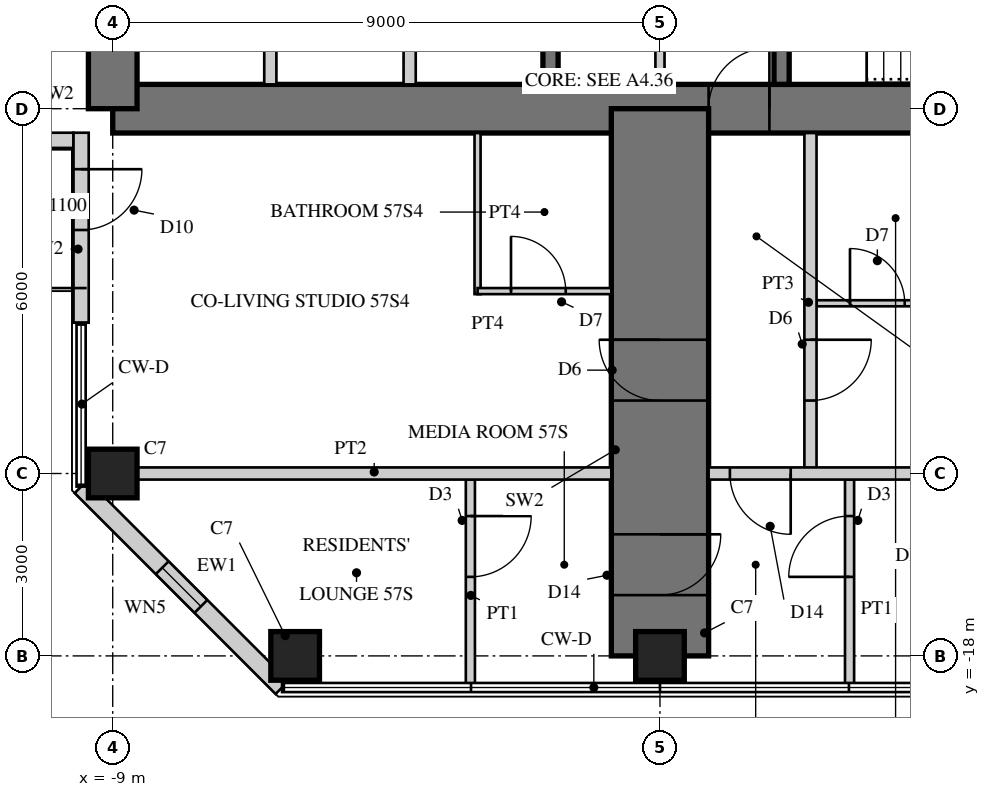
"""IFC4 building model, lengths in metres.
Left out: names, types, materials, properties, quantities, classifications, styles, units other than length and angle.
Written with IfcOpenShell. Run it as: python <this file> out.ifc"""

import sys

from ifc_helpers import new_model, si_unit, direction, frame, frame_2d, origin, origin_2d, place, context, subcontext, project, spatial, rectangle, hollow_rectangle, extrude, element, fill, save


model = new_model("IFC4")
c1 = context("Model", 3, precision=1e-05, world=origin(), true_north=direction((0.0, 1.0)))
c2 = subcontext(c1, "Body", "Model", "MODEL_VIEW")
j1 = project(units=[si_unit("LENGTHUNIT", "METRE"), si_unit("PLANEANGLEUNIT", "RADIAN")], contexts=[c1])
p1 = place(None, origin())
s1 = spatial("IfcSite", under=j1, at=p1, CompositionType="ELEMENT")
p2 = place(p1, origin())
s2 = spatial("IfcBuilding", under=s1, at=p2, CompositionType="ELEMENT")
p3 = place(p2, frame((0.0, 0.0, 225.5)))
s3 = spatial("IfcBuildingStorey", under=s2, at=p3, CompositionType="ELEMENT", Elevation=225.5)
p4 = place(p3, frame((-9.0, -9.0, 0.0), z_axis=(0.0, 0.0, 1.0), x_axis=(1.0, 0.0, 0.0)))
e1 = element("IfcWall", 1, at=p4, inside=s3, PredefinedType="SHEAR", context=c2, shape_type="SweptSolid", body=[
    extrude(rectangle(XDim=18.0, YDim=0.8, at=frame_2d((9.0, 0.0))), origin(), (0.0, 0.0, 1.0), 3.4),
])
p5 = place(p4, frame((9.8, 0.0, 0.0)))
e2 = element("IfcOpeningElement", 2, at=p5, cuts=e1, PredefinedType="OPENING", context=c2, shape_type="SweptSolid", body=[
    extrude(rectangle(XDim=1.0, YDim=2.4, at=frame_2d((0.5, 1.2))), frame((0.0, 0.41, 0.0), z_axis=(0.0, -1.0, 0.0), x_axis=(1.0, 0.0, 0.0)), (0.0, 0.0, 1.0), 0.82),
])
p6 = place(p3, frame((-9.0, 9.0, 0.0), z_axis=(0.0, 0.0, 1.0), x_axis=(0.0, -1.0, 0.0)))
e3 = element("IfcWall", 3, at=p6, inside=s3, PredefinedType="SHEAR", context=c2, shape_type="SweptSolid", body=[
    extrude(rectangle(XDim=18.0, YDim=0.8, at=frame_2d((9.0, 0.0))), origin(), (0.0, 0.0, 1.0), 3.4),
])
p7 = place(p6, frame((9.8, 0.0, 0.0)))
e4 = element("IfcOpeningElement", 4, at=p7, cuts=e3, PredefinedType="OPENING", context=c2, shape_type="SweptSolid", body=[
    extrude(rectangle(XDim=1.0, YDim=2.4, at=frame_2d((0.5, 1.2))), frame((0.0, 0.41, 0.0), z_axis=(0.0, -1.0, 0.0), x_axis=(1.0, 0.0, 0.0)), (0.0, 0.0, 1.0), 0.82),
])
p8 = place(p3, frame((-1.8, -1.875, 0.0), z_axis=(0.0, 0.0, 1.0), x_axis=(0.0, -1.0, 0.0)))
e5 = element("IfcWall", 5, at=p8, inside=s3, PredefinedType="SHEAR", context=c2, shape_type="SweptSolid", body=[
    extrude(rectangle(XDim=6.725, YDim=0.25, at=frame_2d((3.363, 0.0))), origin(), (0.0, 0.0, 1.0), 3.4),
])
p9 = place(p8, frame((1.875, 0.0, 0.0)))
e6 = element("IfcOpeningElement", 6, at=p9, cuts=e5, PredefinedType="OPENING", context=c2, shape_type="SweptSolid", body=[
    extrude(rectangle(XDim=1.6, YDim=2.4, at=frame_2d((0.8, 1.2))), frame((0.0, 0.135, 0.0), z_axis=(0.0, -1.0, 0.0), x_axis=(1.0, 0.0, 0.0)), (0.0, 0.0, 1.0), 0.27),
])
for number, where, z_axis, x_axis in (
    (7, (-4.117, -5.975, 0.0), (0.0, 0.0, 1.0), (0.0, -1.0, 0.0)),
    (8, (-6.408, -5.975, 0.0), (0.0, 0.0, 1.0), (0.0, -1.0, 0.0)),
):
    element("IfcWall", number, at=place(p3, frame(where, z_axis=z_axis, x_axis=x_axis)), inside=s3, PredefinedType="PARTITIONING", context=c2, shape_type="SweptSolid", body=[
        extrude(rectangle(XDim=2.625, YDim=0.2, at=frame_2d((1.312, 0.0))), origin(), (0.0, 0.0, 1.0), 3.4),
    ])
p10 = place(p3, frame((2.0, -1.675, 0.0), z_axis=(0.0, 0.0, 1.0), x_axis=(0.0, -1.0, 0.0)))
e9 = element("IfcWall", 9, at=p10, inside=s3, PredefinedType="SHEAR", context=c2, shape_type="SweptSolid", body=[
    extrude(rectangle(XDim=6.925, YDim=0.25, at=frame_2d((3.462, 0.0))), origin(), (0.0, 0.0, 1.0), 3.4),
])
p11 = place(p10, frame((0.725, 0.0, 0.0)))
e10 = element("IfcOpeningElement", 10, at=p11, cuts=e9, PredefinedType="OPENING", context=c2, shape_type="SweptSolid", body=[
    extrude(rectangle(XDim=1.0, YDim=2.1, at=frame_2d((0.5, 1.05))), frame((0.0, 0.135, 0.0), z_axis=(0.0, -1.0, 0.0), x_axis=(1.0, 0.0, 0.0)), (0.0, 0.0, 1.0), 0.27),
])
p12 = place(p3, frame((0.0, -9.0, 0.0), z_axis=(0.0, 0.0, 1.0), x_axis=(0.0, -1.0, 0.0)))
e11 = element("IfcWall", 11, at=p12, inside=s3, PredefinedType="SHEAR", context=c2, shape_type="SweptSolid", body=[
    extrude(rectangle(XDim=9.0, YDim=1.6, at=frame_2d((4.5, 0.0))), origin(), (0.0, 0.0, 1.0), 3.4),
])
p13 = place(p12, frame((3.8, 0.0, 0.0)))
e12 = element("IfcOpeningElement", 12, at=p13, cuts=e11, PredefinedType="OPENING", context=c2, shape_type="SweptSolid", body=[
    extrude(rectangle(XDim=1.0, YDim=2.15, at=frame_2d((0.5, 1.075))), frame((0.0, 0.81, 0.0), z_axis=(0.0, -1.0, 0.0), x_axis=(1.0, 0.0, 0.0)), (0.0, 0.0, 1.0), 1.62),
])
p14 = place(p12, frame((7.0, 0.0, 0.0)))
e13 = element("IfcOpeningElement", 13, at=p14, cuts=e11, PredefinedType="OPENING", context=c2, shape_type="SweptSolid", body=[
    extrude(rectangle(XDim=1.0, YDim=2.2, at=frame_2d((0.5, 1.1))), frame((0.0, 0.81, 0.0), z_axis=(0.0, -1.0, 0.0), x_axis=(1.0, 0.0, 0.0)), (0.0, 0.0, 1.0), 1.62),
])
for number, where, z_axis, x_axis in (
    (14, (-9.0, -15.0, 0.0), (0.0, 0.0, 1.0), (1.0, 0.0, 0.0)),
    (15, (-6.0, -18.0, 0.0), (0.0, 0.0, 1.0), (1.0, 0.0, 0.0)),
    (16, (0.0, -18.0, 0.0), (0.0, 0.0, 1.0), (1.0, 0.0, 0.0)),
):
    element("IfcColumn", number, at=place(p3, frame(where, z_axis=z_axis, x_axis=x_axis)), inside=s3, PredefinedType="COLUMN", context=c2, shape_type="SweptSolid", body=[
        extrude(rectangle(XDim=0.8, YDim=0.8, at=origin_2d()), origin(), (0.0, 0.0, 1.0), 3.4),
    ])
p15 = place(p3, frame((-12.52, -9.52, 0.0), z_axis=(0.0, 0.0, 1.0), x_axis=(1.0, 0.0, 0.0)))
e17 = element("IfcWall", 17, at=p15, inside=s3, PredefinedType="SOLIDWALL", context=c2, shape_type="SweptSolid", body=[
    extrude(rectangle(XDim=2.875, YDim=0.25, at=frame_2d((1.438, 0.0))), origin(), (0.0, 0.0, 1.0), 3.22),
])
p16 = place(p15, frame((0.6, 0.0, 0.0)))
e18 = element("IfcOpeningElement", 18, at=p16, cuts=e17, PredefinedType="OPENING", context=c2, shape_type="SweptSolid", body=[
    extrude(rectangle(XDim=1.0, YDim=2.2, at=frame_2d((0.5, 1.1))), frame((0.0, 0.135, 0.0), z_axis=(0.0, -1.0, 0.0), x_axis=(1.0, 0.0, 0.0)), (0.0, 0.0, 1.0), 0.27),
])
p17 = place(p3, frame((-9.52, -9.395, 0.0), z_axis=(0.0, 0.0, 1.0), x_axis=(0.0, -1.0, 0.0)))
e19 = element("IfcWall", 19, at=p17, inside=s3, PredefinedType="SOLIDWALL", context=c2, shape_type="SweptSolid", body=[
    extrude(rectangle(XDim=3.125, YDim=0.25, at=frame_2d((1.562, 0.0))), origin(), (0.0, 0.0, 1.0), 3.22),
])
p18 = place(p17, frame((0.6, 0.0, 0.0)))
e20 = element("IfcOpeningElement", 20, at=p18, cuts=e19, PredefinedType="OPENING", context=c2, shape_type="SweptSolid", body=[
    extrude(rectangle(XDim=1.0, YDim=2.2, at=frame_2d((0.5, 1.1))), frame((0.0, 0.135, 0.0), z_axis=(0.0, -1.0, 0.0), x_axis=(1.0, 0.0, 0.0)), (0.0, 0.0, 1.0), 0.27),
])
p19 = place(p3, frame((-9.52, -15.215, 0.0), z_axis=(0.0, 0.0, 1.0), x_axis=(0.707106781187, -0.707106781187, 0.0)))
e21 = element("IfcWall", 21, at=p19, inside=s3, PredefinedType="SOLIDWALL", context=c2, shape_type="SweptSolid", body=[
    extrude(rectangle(XDim=4.674, YDim=0.3, at=frame_2d((2.337, 0.0))), origin(), (0.0, 0.0, 1.0), 3.22),
])
p20 = place(p19, frame((1.887, 0.0, 0.3)))
e22 = element("IfcOpeningElement", 22, at=p20, cuts=e21, PredefinedType="OPENING", context=c2, shape_type="SweptSolid", body=[
    extrude(rectangle(XDim=0.9, YDim=2.4, at=frame_2d((0.45, 1.2))), frame((0.0, 0.16, 0.0), z_axis=(0.0, -1.0, 0.0), x_axis=(1.0, 0.0, 0.0)), (0.0, 0.0, 1.0), 0.32),
])
p21 = place(p3, frame((0.0, -5.675, 0.0), z_axis=(0.0, 0.0, 1.0), x_axis=(0.0, -1.0, 0.0)))
e23 = element("IfcWall", 23, at=p21, inside=s3, PredefinedType="PARTITIONING", context=c2, shape_type="SweptSolid", body=[
    extrude(rectangle(XDim=2.925, YDim=0.15, at=frame_2d((1.462, 0.0))), origin(), (0.0, 0.0, 1.0), 3.22),
])
p22 = place(p21, frame((0.4, 0.0, 0.0)))
e24 = element("IfcOpeningElement", 24, at=p22, cuts=e23, PredefinedType="OPENING", context=c2, shape_type="SweptSolid", body=[
    extrude(rectangle(XDim=1.0, YDim=2.1, at=frame_2d((0.5, 1.05))), frame((0.0, 0.085, 0.0), z_axis=(0.0, -1.0, 0.0), x_axis=(1.0, 0.0, 0.0)), (0.0, 0.0, 1.0), 0.17),
])
p23 = place(p3, frame((2.575, -12.2, 0.0), z_axis=(0.0, 0.0, 1.0), x_axis=(1.0, 0.0, 0.0)))
e25 = element("IfcWall", 25, at=p23, inside=s3, PredefinedType="PARTITIONING", context=c2, shape_type="SweptSolid", body=[
    extrude(rectangle(XDim=2.6, YDim=0.1, at=frame_2d((1.3, 0.0))), origin(), (0.0, 0.0, 1.0), 3.22),
])
p24 = place(p23, frame((0.55, 0.0, 0.0)))
e26 = element("IfcOpeningElement", 26, at=p24, cuts=e25, PredefinedType="OPENING", context=c2, shape_type="SweptSolid", body=[
    extrude(rectangle(XDim=0.9, YDim=2.1, at=frame_2d((0.45, 1.05))), frame((0.0, 0.06, 0.0), z_axis=(0.0, -1.0, 0.0), x_axis=(1.0, 0.0, 0.0)), (0.0, 0.0, 1.0), 0.12),
])
p25 = place(p3, frame((-3.0, -9.4, 0.0), z_axis=(0.0, 0.0, 1.0), x_axis=(0.0, -1.0, 0.0)))
e27 = element("IfcWall", 27, at=p25, inside=s3, PredefinedType="PARTITIONING", context=c2, shape_type="SweptSolid", body=[
    extrude(rectangle(XDim=2.65, YDim=0.1, at=frame_2d((1.325, 0.0))), origin(), (0.0, 0.0, 1.0), 3.22),
])
p26 = place(p3, frame((-3.0, -12.0, 0.0), z_axis=(0.0, 0.0, 1.0), x_axis=(1.0, 0.0, 0.0)))
e28 = element("IfcWall", 28, at=p26, inside=s3, PredefinedType="PARTITIONING", context=c2, shape_type="SweptSolid", body=[
    extrude(rectangle(XDim=2.2, YDim=0.1, at=frame_2d((1.1, 0.0))), origin(), (0.0, 0.0, 1.0), 3.22),
])
p27 = place(p26, frame((0.55, 0.0, 0.0)))
e29 = element("IfcOpeningElement", 29, at=p27, cuts=e28, PredefinedType="OPENING", context=c2, shape_type="SweptSolid", body=[
    extrude(rectangle(XDim=0.9, YDim=2.1, at=frame_2d((0.45, 1.05))), frame((0.0, 0.06, 0.0), z_axis=(0.0, -1.0, 0.0), x_axis=(1.0, 0.0, 0.0)), (0.0, 0.0, 1.0), 0.12),
])
p28 = place(p3, frame((2.475, -9.4, 0.0), z_axis=(0.0, 0.0, 1.0), x_axis=(0.0, -1.0, 0.0)))
e30 = element("IfcWall", 30, at=p28, inside=s3, PredefinedType="SOLIDWALL", context=c2, shape_type="SweptSolid", body=[
    extrude(rectangle(XDim=5.6, YDim=0.2, at=frame_2d((2.8, 0.0))), origin(), (0.0, 0.0, 1.0), 3.22),
])
p29 = place(p28, frame((3.4, 0.0, 0.0)))
e31 = element("IfcOpeningElement", 31, at=p29, cuts=e30, PredefinedType="OPENING", context=c2, shape_type="SweptSolid", body=[
    extrude(rectangle(XDim=1.0, YDim=2.15, at=frame_2d((0.5, 1.075))), frame((0.0, 0.11, 0.0), z_axis=(0.0, -1.0, 0.0), x_axis=(1.0, 0.0, 0.0)), (0.0, 0.0, 1.0), 0.22),
])
p30 = place(p3, frame((3.118, -15.1, 0.0), z_axis=(0.0, 0.0, 1.0), x_axis=(0.0, -1.0, 0.0)))
e32 = element("IfcWall", 32, at=p30, inside=s3, PredefinedType="PARTITIONING", context=c2, shape_type="SweptSolid", body=[
    extrude(rectangle(XDim=3.38, YDim=0.15, at=frame_2d((1.69, 0.0))), origin(), (0.0, 0.0, 1.0), 3.22),
])
p31 = place(p30, frame((0.6, 0.0, 0.0)))
e33 = element("IfcOpeningElement", 33, at=p31, cuts=e32, PredefinedType="OPENING", context=c2, shape_type="SweptSolid", body=[
    extrude(rectangle(XDim=1.0, YDim=2.1, at=frame_2d((0.5, 1.05))), frame((0.0, 0.085, 0.0), z_axis=(0.0, -1.0, 0.0), x_axis=(1.0, 0.0, 0.0)), (0.0, 0.0, 1.0), 0.17),
])
p32 = place(p3, frame((-3.118, -15.1, 0.0), z_axis=(0.0, 0.0, 1.0), x_axis=(0.0, -1.0, 0.0)))
e34 = element("IfcWall", 34, at=p32, inside=s3, PredefinedType="PARTITIONING", context=c2, shape_type="SweptSolid", body=[
    extrude(rectangle(XDim=3.38, YDim=0.15, at=frame_2d((1.69, 0.0))), origin(), (0.0, 0.0, 1.0), 3.22),
])
p33 = place(p32, frame((0.6, 0.0, 0.0)))
e35 = element("IfcOpeningElement", 35, at=p33, cuts=e34, PredefinedType="OPENING", context=c2, shape_type="SweptSolid", body=[
    extrude(rectangle(XDim=1.0, YDim=2.1, at=frame_2d((0.5, 1.05))), frame((0.0, 0.085, 0.0), z_axis=(0.0, -1.0, 0.0), x_axis=(1.0, 0.0, 0.0)), (0.0, 0.0, 1.0), 0.17),
])
p34 = place(p3, frame((-8.6, -15.0, 0.0), z_axis=(0.0, 0.0, 1.0), x_axis=(1.0, 0.0, 0.0)))
e36 = element("IfcWall", 36, at=p34, inside=s3, PredefinedType="SOLIDWALL", context=c2, shape_type="SweptSolid", body=[
    extrude(rectangle(XDim=7.8, YDim=0.2, at=frame_2d((3.9, 0.0))), origin(), (0.0, 0.0, 1.0), 2.52),
])
p35 = place(p3, frame((0.8, -15.0, 0.0), z_axis=(0.0, 0.0, 1.0), x_axis=(1.0, 0.0, 0.0)))
e37 = element("IfcWall", 37, at=p35, inside=s3, PredefinedType="SOLIDWALL", context=c2, shape_type="SweptSolid", body=[
    extrude(rectangle(XDim=7.8, YDim=0.2, at=frame_2d((3.9, 0.0))), origin(), (0.0, 0.0, 1.0), 2.52),
])
p36 = place(p35, frame((0.35, 0.0, 0.0)))
e38 = element("IfcOpeningElement", 38, at=p36, cuts=e37, PredefinedType="OPENING", context=c2, shape_type="SweptSolid", body=[
    extrude(rectangle(XDim=1.0, YDim=2.2, at=frame_2d((0.5, 1.1))), frame((0.0, 0.11, 0.0), z_axis=(0.0, -1.0, 0.0), x_axis=(1.0, 0.0, 0.0)), (0.0, 0.0, 1.0), 0.22),
])
p37 = place(p18, origin())
e39 = element("IfcDoor", 39, at=p37, inside=s3, OperationType="SINGLE_SWING_LEFT", PredefinedType="DOOR", context=c2, shape_type="SweptSolid", body=[
    extrude(hollow_rectangle(XDim=1.0, YDim=2.2, WallThickness=0.06, at=frame_2d((0.5, 1.1))), frame((0.0, 0.025, 0.0), z_axis=(0.0, -1.0, 0.0), x_axis=(1.0, 0.0, 0.0)), (0.0, 0.0, 1.0), 0.05),
    extrude(rectangle(XDim=0.879, YDim=2.079, at=frame_2d((0.5, 1.1))), frame((0.0, 0.025, 0.0), z_axis=(0.0, -1.0, 0.0), x_axis=(1.0, 0.0, 0.0)), (0.0, 0.0, 1.0), 0.05),
])
fill(e20, e39)
p38 = place(p20, origin())
e40 = element("IfcWindow", 40, at=p38, inside=s3, PartitioningType="SINGLE_PANEL", PredefinedType="WINDOW", context=c2, shape_type="SweptSolid", body=[
    extrude(hollow_rectangle(XDim=0.9, YDim=2.4, WallThickness=0.06, at=frame_2d((0.45, 1.2))), frame((0.0, 0.03, 0.0), z_axis=(0.0, -1.0, 0.0), x_axis=(1.0, 0.0, 0.0)), (0.0, 0.0, 1.0), 0.06),
    extrude(rectangle(XDim=0.779, YDim=2.279, at=frame_2d((0.45, 1.2))), frame((0.0, 0.03, 0.0), z_axis=(0.0, -1.0, 0.0), x_axis=(1.0, 0.0, 0.0)), (0.0, 0.0, 1.0), 0.06),
])
fill(e22, e40)
p39 = place(p24, origin())
e41 = element("IfcDoor", 41, at=p39, inside=s3, OperationType="SINGLE_SWING_LEFT", PredefinedType="DOOR", context=c2, shape_type="SweptSolid", body=[
    extrude(rectangle(XDim=0.9, YDim=2.1, at=frame_2d((0.45, 1.05))), frame((0.0, 0.025, 0.0), z_axis=(0.0, -1.0, 0.0), x_axis=(1.0, 0.0, 0.0)), (0.0, 0.0, 1.0), 0.05),
])
fill(e26, e41)
p40 = place(p27, origin())
e42 = element("IfcDoor", 42, at=p40, inside=s3, OperationType="SINGLE_SWING_LEFT", PredefinedType="DOOR", context=c2, shape_type="SweptSolid", body=[
    extrude(rectangle(XDim=0.9, YDim=2.1, at=frame_2d((0.45, 1.05))), frame((0.0, 0.025, 0.0), z_axis=(0.0, -1.0, 0.0), x_axis=(1.0, 0.0, 0.0)), (0.0, 0.0, 1.0), 0.05),
])
fill(e29, e42)
p41 = place(p29, origin())
e43 = element("IfcDoor", 43, at=p41, inside=s3, OperationType="SINGLE_SWING_LEFT", PredefinedType="DOOR", context=c2, shape_type="SweptSolid", body=[
    extrude(rectangle(XDim=1.0, YDim=2.15, at=frame_2d((0.5, 1.075))), frame((0.0, 0.025, 0.0), z_axis=(0.0, -1.0, 0.0), x_axis=(1.0, 0.0, 0.0)), (0.0, 0.0, 1.0), 0.05),
])
fill(e31, e43)
p42 = place(p31, frame((1.0, 0.0, 0.0), z_axis=(0.0, 0.0, 1.0), x_axis=(-1.0, 0.0, 0.0)))
e44 = element("IfcDoor", 44, at=p42, inside=s3, OperationType="SINGLE_SWING_LEFT", PredefinedType="DOOR", context=c2, shape_type="SweptSolid", body=[
    extrude(rectangle(XDim=1.0, YDim=2.1, at=frame_2d((0.5, 1.05))), frame((0.0, 0.025, 0.0), z_axis=(0.0, -1.0, 0.0), x_axis=(1.0, 0.0, 0.0)), (0.0, 0.0, 1.0), 0.05),
])
fill(e33, e44)
p43 = place(p33, origin())
e45 = element("IfcDoor", 45, at=p43, inside=s3, OperationType="SINGLE_SWING_LEFT", PredefinedType="DOOR", context=c2, shape_type="SweptSolid", body=[
    extrude(rectangle(XDim=1.0, YDim=2.1, at=frame_2d((0.5, 1.05))), frame((0.0, 0.025, 0.0), z_axis=(0.0, -1.0, 0.0), x_axis=(1.0, 0.0, 0.0)), (0.0, 0.0, 1.0), 0.05),
])
fill(e35, e45)
p44 = place(p36, frame((1.0, 0.0, 0.0), z_axis=(0.0, 0.0, 1.0), x_axis=(-1.0, 0.0, 0.0)))
e46 = element("IfcDoor", 46, at=p44, inside=s3, OperationType="SINGLE_SWING_LEFT", PredefinedType="DOOR", context=c2, shape_type="SweptSolid", body=[
    extrude(rectangle(XDim=1.0, YDim=2.2, at=frame_2d((0.5, 1.1))), frame((0.0, 0.025, 0.0), z_axis=(0.0, -1.0, 0.0), x_axis=(1.0, 0.0, 0.0)), (0.0, 0.0, 1.0), 0.05),
])
fill(e38, e46)
p45 = place(p13, frame((1.0, 0.0, 0.0), z_axis=(0.0, 0.0, 1.0), x_axis=(-1.0, 0.0, 0.0)))
e47 = element("IfcDoor", 47, at=p45, inside=s3, OperationType="SINGLE_SWING_RIGHT", PredefinedType="DOOR", context=c2, shape_type="SweptSolid", body=[
    extrude(rectangle(XDim=1.0, YDim=2.15, at=frame_2d((0.5, 1.075))), frame((0.0, 0.025, 0.0), z_axis=(0.0, -1.0, 0.0), x_axis=(1.0, 0.0, 0.0)), (0.0, 0.0, 1.0), 0.05),
])
fill(e12, e47)
p46 = place(p14, origin())
e48 = element("IfcDoor", 48, at=p46, inside=s3, OperationType="SINGLE_SWING_LEFT", PredefinedType="DOOR", context=c2, shape_type="SweptSolid", body=[
    extrude(rectangle(XDim=1.0, YDim=2.2, at=frame_2d((0.5, 1.1))), frame((0.0, 0.025, 0.0), z_axis=(0.0, -1.0, 0.0), x_axis=(1.0, 0.0, 0.0)), (0.0, 0.0, 1.0), 0.05),
])
fill(e13, e48)
p47 = place(p5, origin())
e49 = element("IfcDoor", 49, at=p47, inside=s3, OperationType="SINGLE_SWING_RIGHT", PredefinedType="DOOR", context=c2, shape_type="SweptSolid", body=[
    extrude(rectangle(XDim=1.0, YDim=2.4, at=frame_2d((0.5, 1.2))), frame((0.0, 0.055, 0.0), z_axis=(0.0, -1.0, 0.0), x_axis=(1.0, 0.0, 0.0)), (0.0, 0.0, 1.0), 0.05),
])
fill(e2, e49)
save(model, sys.argv[1])
